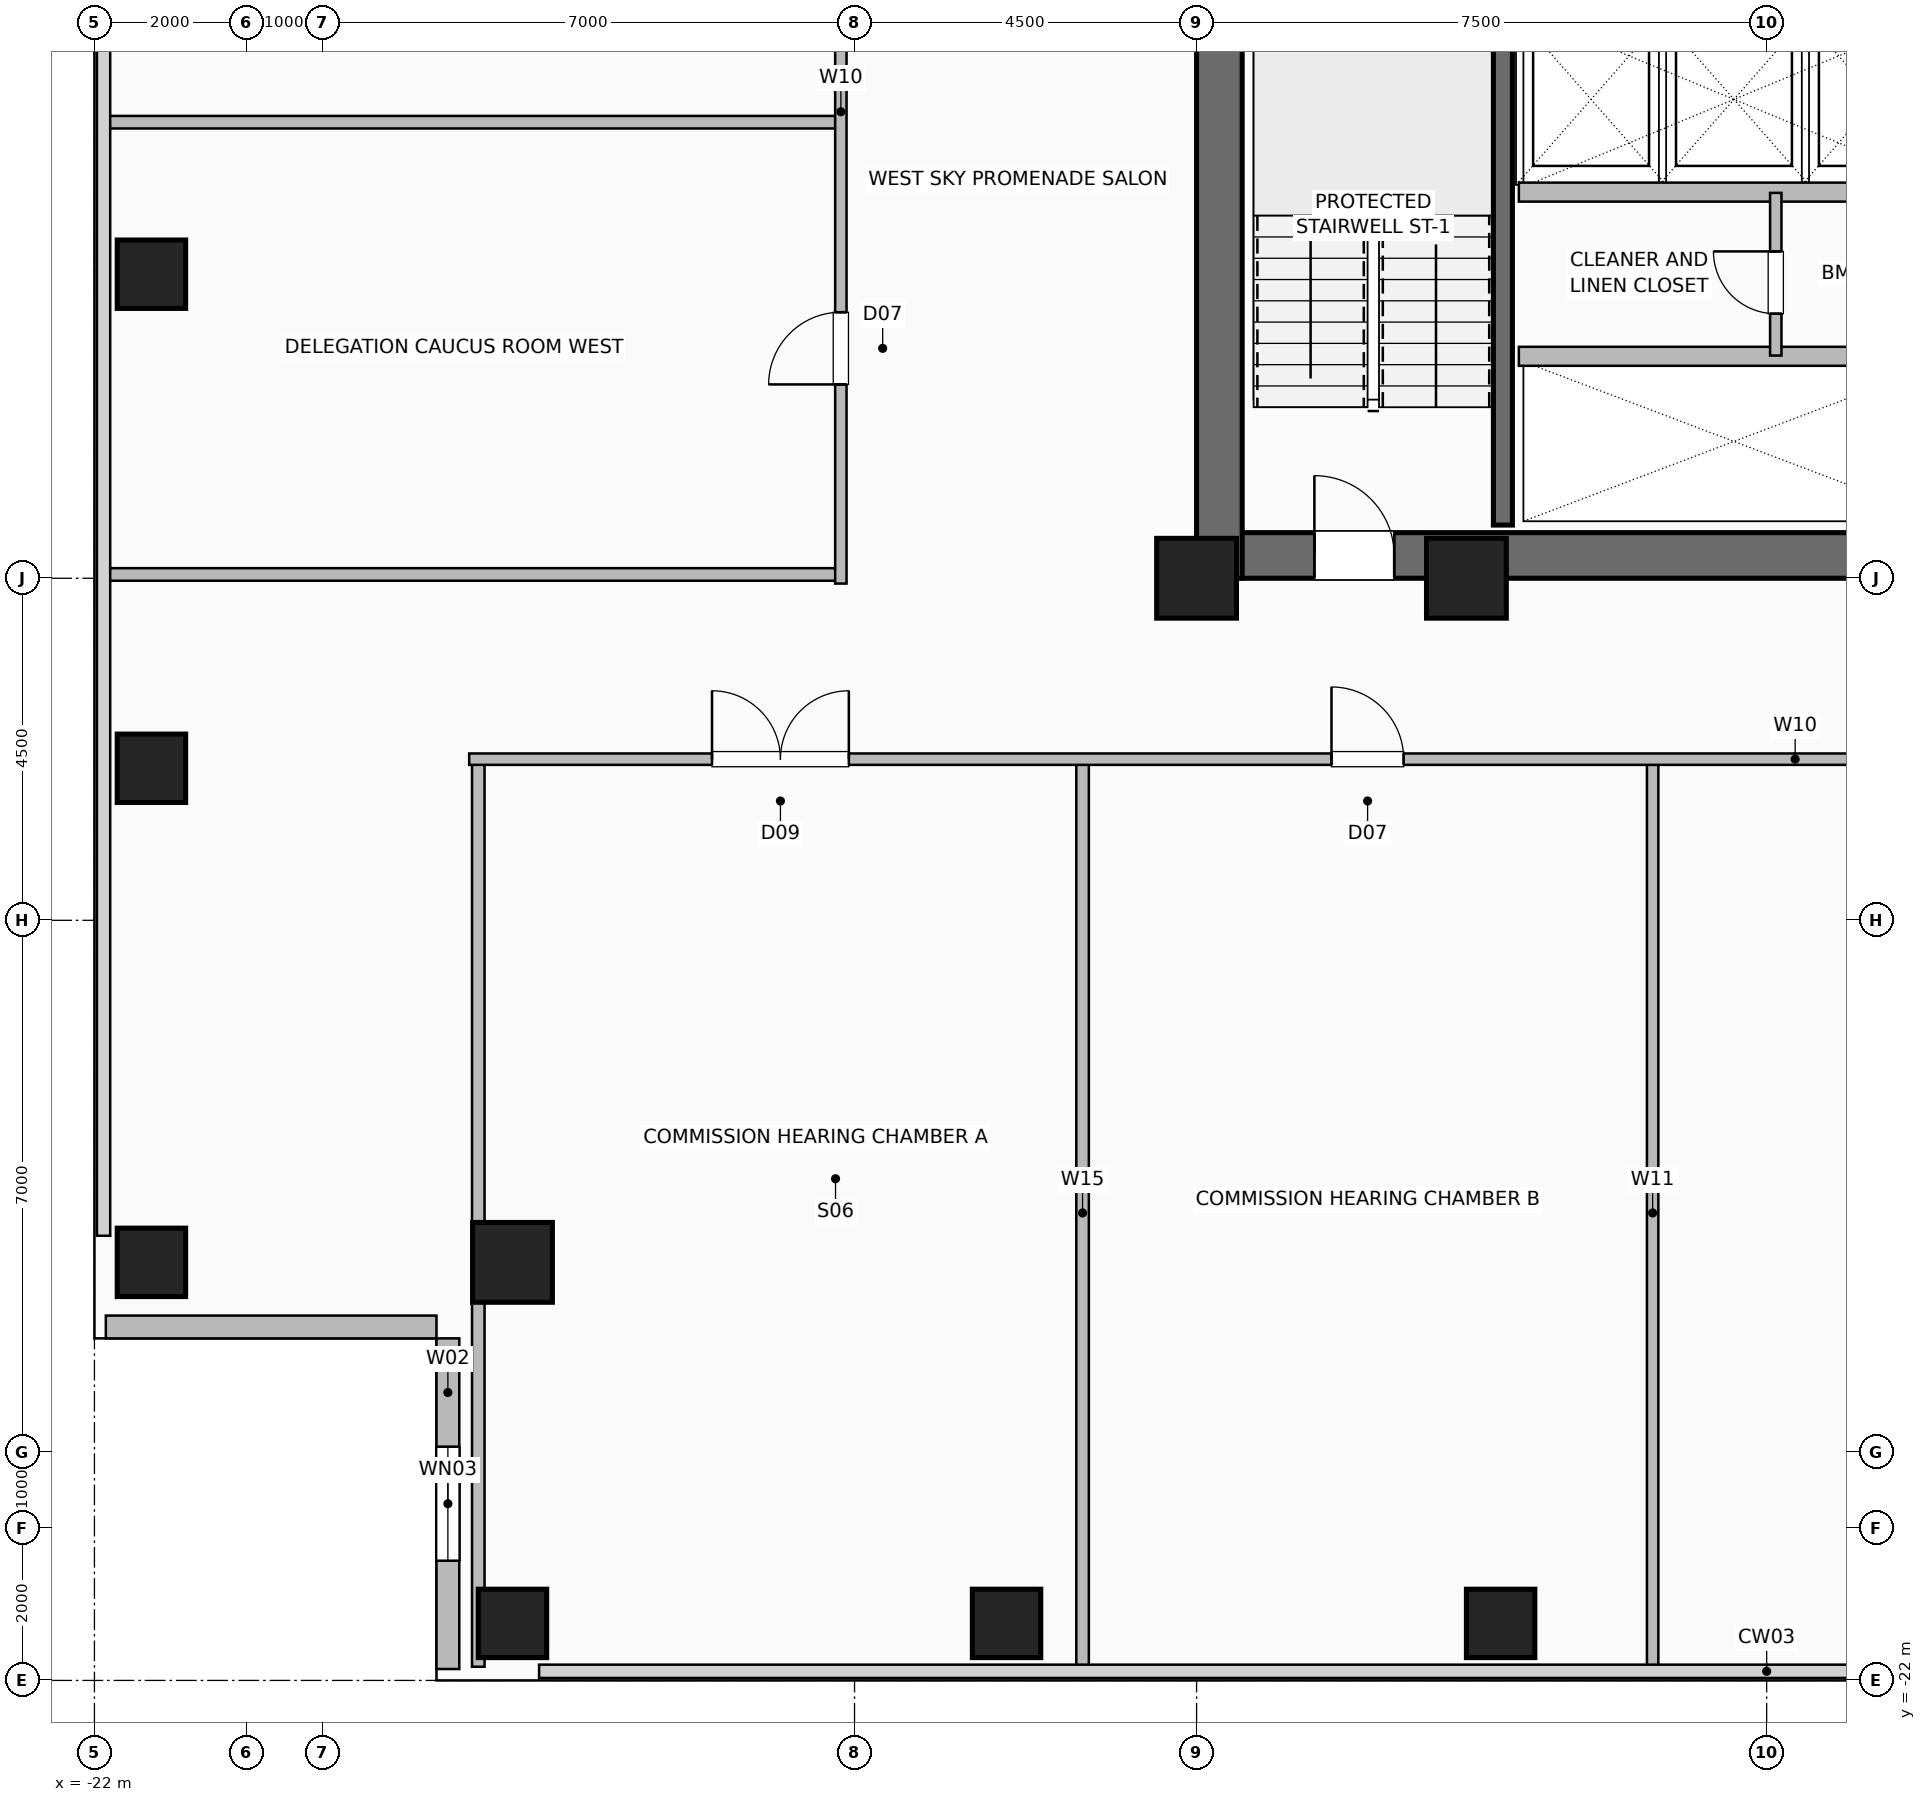
"""IFC4 building model, lengths in metres.
Left out: names, types, materials, properties, quantities, classifications, styles, units other than length and angle.
Written with IfcOpenShell. Run it as: python <this file> out.ifc"""

import sys

from ifc_helpers import new_model, si_unit, direction, frame, frame_2d, origin, origin_2d, place, context, subcontext, project, spatial, rectangle, hollow_rectangle, extrude, element, fill, save


model = new_model("IFC4")
c1 = context("Model", 3, precision=1e-05, world=origin(), true_north=direction((0.0, 1.0)))
c2 = subcontext(c1, "Body", "Model", "MODEL_VIEW")
j1 = project(units=[si_unit("LENGTHUNIT", "METRE"), si_unit("PLANEANGLEUNIT", "RADIAN")], contexts=[c1])
p1 = place(None, origin())
s1 = spatial("IfcSite", under=j1, at=p1, CompositionType="ELEMENT")
p2 = place(p1, origin())
s2 = spatial("IfcBuilding", under=s1, at=p2, CompositionType="ELEMENT")
p3 = place(p2, frame((0.0, 0.0, 97.6)))
s3 = spatial("IfcBuildingStorey", under=s2, at=p3, CompositionType="ELEMENT", Elevation=97.6)
for number, where, z_axis, x_axis in (
    (1, (-7.5, -7.5, 0.0), (0.0, 0.0, 1.0), (1.0, 0.0, 0.0)),
    (2, (-3.95, -7.5, 0.0), (0.0, 0.0, 1.0), (1.0, 0.0, 0.0)),
):
    element("IfcColumn", number, at=place(p3, frame(where, z_axis=z_axis, x_axis=x_axis)), inside=s3, PredefinedType="COLUMN", context=c2, shape_type="SweptSolid", body=[
        extrude(hollow_rectangle(XDim=1.05, YDim=1.05, WallThickness=0.05, at=origin_2d()), origin(), (0.0, 0.0, 1.0), 3.6),
    ])
for number, where, z_axis, x_axis in (
    (3, (-16.5, -21.25, 0.0), (0.0, 0.0, 1.0), (1.0, 0.0, 0.0)),
    (4, (-21.25, -16.5, 0.0), (0.0, 0.0, 1.0), (1.0, 0.0, 0.0)),
    (5, (-10.0, -21.25, 0.0), (0.0, 0.0, 1.0), (1.0, 0.0, 0.0)),
    (6, (-21.25, -10.0, 0.0), (0.0, 0.0, 1.0), (1.0, 0.0, 0.0)),
    (7, (-3.5, -21.25, 0.0), (0.0, 0.0, 1.0), (1.0, 0.0, 0.0)),
    (8, (-21.25, -3.5, 0.0), (0.0, 0.0, 1.0), (1.0, 0.0, 0.0)),
):
    element("IfcColumn", number, at=place(p3, frame(where, z_axis=z_axis, x_axis=x_axis)), inside=s3, PredefinedType="COLUMN", context=c2, shape_type="SweptSolid", body=[
        extrude(hollow_rectangle(XDim=0.9, YDim=0.9, WallThickness=0.045, at=origin_2d()), origin(), (0.0, 0.0, 1.0), 3.6),
    ])
p4 = place(p3, frame((-16.5, -16.5, 0.0), z_axis=(0.0, 0.0, 1.0), x_axis=(1.0, 0.0, 0.0)))
e9 = element("IfcColumn", 9, at=p4, inside=s3, PredefinedType="COLUMN", context=c2, shape_type="SweptSolid", body=[
    extrude(hollow_rectangle(XDim=1.05, YDim=1.05, WallThickness=0.05, at=origin_2d()), origin(), (0.0, 0.0, 1.0), 3.6),
])
p5 = place(p3, frame((-17.35, -21.85, 0.0), z_axis=(0.0, 0.0, 1.0), x_axis=(0.0, 1.0, 0.0)))
e10 = element("IfcWall", 10, at=p5, inside=s3, PredefinedType="SOLIDWALL", context=c2, shape_type="SweptSolid", body=[
    extrude(rectangle(XDim=4.35, YDim=0.3, at=frame_2d((2.175, 0.0))), origin(), (0.0, 0.0, 1.0), 3.36),
])
p6 = place(p5, frame((1.425, 0.0, 0.9)))
e11 = element("IfcOpeningElement", 11, at=p6, cuts=e10, PredefinedType="OPENING", context=c2, shape_type="SweptSolid", body=[
    extrude(rectangle(XDim=1.5, YDim=1.8, at=frame_2d((0.75, 0.9))), frame((0.0, 0.16, 0.0), z_axis=(0.0, -1.0, 0.0), x_axis=(1.0, 0.0, 0.0)), (0.0, 0.0, 1.0), 0.32),
])
p7 = place(p3, frame((-21.85, -17.35, 0.0), z_axis=(0.0, 0.0, 1.0), x_axis=(1.0, 0.0, 0.0)))
e12 = element("IfcWall", 12, at=p7, inside=s3, PredefinedType="SOLIDWALL", context=c2, shape_type="SweptSolid", body=[
    extrude(rectangle(XDim=4.35, YDim=0.3, at=frame_2d((2.175, 0.0))), origin(), (0.0, 0.0, 1.0), 3.36),
])
p8 = place(p3, frame((-7.5, -7.2, 0.0), z_axis=(0.0, 0.0, 1.0), x_axis=(1.0, 0.0, 0.0)))
e13 = element("IfcWall", 13, at=p8, inside=s3, PredefinedType="SHEAR", context=c2, shape_type="SweptSolid", body=[
    extrude(rectangle(XDim=15.0, YDim=0.6, at=frame_2d((7.5, 0.0))), origin(), (0.0, 0.0, 1.0), 3.36),
])
p9 = place(p8, frame((1.55, 0.0, 0.0)))
e14 = element("IfcOpeningElement", 14, at=p9, cuts=e13, PredefinedType="OPENING", context=c2, shape_type="SweptSolid", body=[
    extrude(rectangle(XDim=1.05, YDim=2.08, at=frame_2d((0.525, 1.04))), frame((0.0, 0.31, 0.0), z_axis=(0.0, -1.0, 0.0), x_axis=(1.0, 0.0, 0.0)), (0.0, 0.0, 1.0), 0.62),
])
p10 = place(p8, frame((12.4, 0.0, 0.0)))
e15 = element("IfcOpeningElement", 15, at=p10, cuts=e13, PredefinedType="OPENING", context=c2, shape_type="SweptSolid", body=[
    extrude(rectangle(XDim=1.05, YDim=2.08, at=frame_2d((0.525, 1.04))), frame((0.0, 0.31, 0.0), z_axis=(0.0, -1.0, 0.0), x_axis=(1.0, 0.0, 0.0)), (0.0, 0.0, 1.0), 0.62),
])
p11 = place(p3, frame((-7.2, -7.5, 0.0), z_axis=(0.0, 0.0, 1.0), x_axis=(0.0, 1.0, 0.0)))
e16 = element("IfcWall", 16, at=p11, inside=s3, PredefinedType="SHEAR", context=c2, shape_type="SweptSolid", body=[
    extrude(rectangle(XDim=15.0, YDim=0.6, at=frame_2d((7.5, 0.0))), origin(), (0.0, 0.0, 1.0), 3.36),
])
p12 = place(p11, frame((9.5, 0.0, 0.0)))
e17 = element("IfcOpeningElement", 17, at=p12, cuts=e16, PredefinedType="OPENING", context=c2, shape_type="SweptSolid", body=[
    extrude(rectangle(XDim=1.0, YDim=2.08, at=frame_2d((0.5, 1.04))), frame((0.0, 0.31, 0.0), z_axis=(0.0, -1.0, 0.0), x_axis=(1.0, 0.0, 0.0)), (0.0, 0.0, 1.0), 0.62),
])
p13 = place(p3, frame((-3.47, -6.8, 0.0), z_axis=(0.0, 0.0, 1.0), x_axis=(0.0, 1.0, 0.0)))
e18 = element("IfcWall", 18, at=p13, inside=s3, PredefinedType="SHEAR", context=c2, shape_type="SweptSolid", body=[
    extrude(rectangle(XDim=7.72, YDim=0.25, at=frame_2d((3.86, 0.0))), origin(), (0.0, 0.0, 1.0), 3.36),
])
for number, where, z_axis, x_axis in (
    (19, (-3.26, -4.58, 0.0), (0.0, 0.0, 1.0), (1.0, 0.0, 0.0)),
    (20, (-3.26, -2.42, 0.0), (0.0, 0.0, 1.0), (1.0, 0.0, 0.0)),
):
    element("IfcWall", number, at=place(p3, frame(where, z_axis=z_axis, x_axis=x_axis)), inside=s3, PredefinedType="SHEAR", context=c2, shape_type="SweptSolid", body=[
        extrude(rectangle(XDim=5.64, YDim=0.25, at=frame_2d((2.82, 0.0))), origin(), (0.0, 0.0, 1.0), 3.36),
    ])
p14 = place(p3, frame((0.12, -4.57, 0.0), z_axis=(0.0, 0.0, 1.0), x_axis=(0.0, 1.0, 0.0)))
e21 = element("IfcWall", 21, at=p14, inside=s3, PredefinedType="PARTITIONING", context=c2, shape_type="SweptSolid", body=[
    extrude(rectangle(XDim=2.14, YDim=0.15, at=frame_2d((1.07, 0.0))), origin(), (0.0, 0.0, 1.0), 3.36),
])
p15 = place(p14, frame((0.55, 0.0, 0.0)))
e22 = element("IfcOpeningElement", 22, at=p15, cuts=e21, PredefinedType="OPENING", context=c2, shape_type="SweptSolid", body=[
    extrude(rectangle(XDim=0.82, YDim=2.05, at=frame_2d((0.41, 1.025))), frame((0.0, 0.085, 0.0), z_axis=(0.0, -1.0, 0.0), x_axis=(1.0, 0.0, 0.0)), (0.0, 0.0, 1.0), 0.17),
])
for number, where, z_axis, x_axis in (
    (23, (-16.95, -21.82, 0.0), (0.0, 0.0, 1.0), (0.0, 1.0, 0.0)),
    (24, (-9.0, -21.82, 0.0), (0.0, 0.0, 1.0), (0.0, 1.0, 0.0)),
):
    element("IfcWall", number, at=place(p3, frame(where, z_axis=z_axis, x_axis=x_axis)), inside=s3, PredefinedType="PLUMBINGWALL", context=c2, shape_type="SweptSolid", body=[
        extrude(rectangle(XDim=11.94, YDim=0.165, at=frame_2d((5.97, 0.0))), origin(), (0.0, 0.0, 1.0), 3.36),
    ])
p16 = place(p3, frame((-1.5, -21.82, 0.0), z_axis=(0.0, 0.0, 1.0), x_axis=(0.0, 1.0, 0.0)))
e25 = element("IfcWall", 25, at=p16, inside=s3, PredefinedType="PARTITIONING", context=c2, shape_type="SweptSolid", body=[
    extrude(rectangle(XDim=11.94, YDim=0.15, at=frame_2d((5.97, 0.0))), origin(), (0.0, 0.0, 1.0), 3.36),
])
p17 = place(p3, frame((-17.07, -9.88, 0.0), z_axis=(0.0, 0.0, 1.0), x_axis=(1.0, 0.0, 0.0)))
e26 = element("IfcWall", 26, at=p17, inside=s3, PredefinedType="PARTITIONING", context=c2, shape_type="SweptSolid", body=[
    extrude(rectangle(XDim=34.14, YDim=0.15, at=frame_2d((17.07, 0.0))), origin(), (0.0, 0.0, 1.0), 3.36),
])
p18 = place(p17, frame((3.195, 0.0, 0.0)))
e27 = element("IfcOpeningElement", 27, at=p18, cuts=e26, PredefinedType="OPENING", context=c2, shape_type="SweptSolid", body=[
    extrude(rectangle(XDim=1.8, YDim=2.08, at=frame_2d((0.9, 1.04))), frame((0.0, 0.085, 0.0), z_axis=(0.0, -1.0, 0.0), x_axis=(1.0, 0.0, 0.0)), (0.0, 0.0, 1.0), 0.17),
])
p19 = place(p17, frame((11.345, 0.0, 0.0)))
e28 = element("IfcOpeningElement", 28, at=p19, cuts=e26, PredefinedType="OPENING", context=c2, shape_type="SweptSolid", body=[
    extrude(rectangle(XDim=0.95, YDim=2.06, at=frame_2d((0.475, 1.03))), frame((0.0, 0.085, 0.0), z_axis=(0.0, -1.0, 0.0), x_axis=(1.0, 0.0, 0.0)), (0.0, 0.0, 1.0), 0.17),
])
p20 = place(p17, frame((22.595, 0.0, 0.0)))
e29 = element("IfcOpeningElement", 29, at=p20, cuts=e26, PredefinedType="OPENING", context=c2, shape_type="SweptSolid", body=[
    extrude(rectangle(XDim=0.95, YDim=2.06, at=frame_2d((0.475, 1.03))), frame((0.0, 0.085, 0.0), z_axis=(0.0, -1.0, 0.0), x_axis=(1.0, 0.0, 0.0)), (0.0, 0.0, 1.0), 0.17),
])
p21 = place(p17, frame((30.925, 0.0, 0.0)))
e30 = element("IfcOpeningElement", 30, at=p21, cuts=e26, PredefinedType="OPENING", context=c2, shape_type="SweptSolid", body=[
    extrude(rectangle(XDim=0.85, YDim=2.05, at=frame_2d((0.425, 1.025))), frame((0.0, 0.085, 0.0), z_axis=(0.0, -1.0, 0.0), x_axis=(1.0, 0.0, 0.0)), (0.0, 0.0, 1.0), 0.17),
])
p22 = place(p17, frame((32.6, 0.0, 0.0)))
e31 = element("IfcOpeningElement", 31, at=p22, cuts=e26, PredefinedType="OPENING", context=c2, shape_type="SweptSolid", body=[
    extrude(rectangle(XDim=0.95, YDim=2.06, at=frame_2d((0.475, 1.03))), frame((0.0, 0.085, 0.0), z_axis=(0.0, -1.0, 0.0), x_axis=(1.0, 0.0, 0.0)), (0.0, 0.0, 1.0), 0.17),
])
for number, where, z_axis, x_axis in (
    (32, (-21.82, -7.45, 0.0), (0.0, 0.0, 1.0), (1.0, 0.0, 0.0)),
    (33, (-21.82, -1.5, 0.0), (0.0, 0.0, 1.0), (1.0, 0.0, 0.0)),
):
    element("IfcWall", number, at=place(p3, frame(where, z_axis=z_axis, x_axis=x_axis)), inside=s3, PredefinedType="PLUMBINGWALL", context=c2, shape_type="SweptSolid", body=[
        extrude(rectangle(XDim=9.64, YDim=0.165, at=frame_2d((4.82, 0.0))), origin(), (0.0, 0.0, 1.0), 3.36),
    ])
p23 = place(p3, frame((-12.18, -7.57, 0.0), z_axis=(0.0, 0.0, 1.0), x_axis=(0.0, 1.0, 0.0)))
e34 = element("IfcWall", 34, at=p23, inside=s3, PredefinedType="PARTITIONING", context=c2, shape_type="SweptSolid", body=[
    extrude(rectangle(XDim=15.14, YDim=0.15, at=frame_2d((7.57, 0.0))), origin(), (0.0, 0.0, 1.0), 3.36),
])
p24 = place(p23, frame((2.62, 0.0, 0.0)))
e35 = element("IfcOpeningElement", 35, at=p24, cuts=e34, PredefinedType="OPENING", context=c2, shape_type="SweptSolid", body=[
    extrude(rectangle(XDim=0.95, YDim=2.06, at=frame_2d((0.475, 1.03))), frame((0.0, 0.085, 0.0), z_axis=(0.0, -1.0, 0.0), x_axis=(1.0, 0.0, 0.0)), (0.0, 0.0, 1.0), 0.17),
])
p25 = place(p23, frame((8.845, 0.0, 0.0)))
e36 = element("IfcOpeningElement", 36, at=p25, cuts=e34, PredefinedType="OPENING", context=c2, shape_type="SweptSolid", body=[
    extrude(rectangle(XDim=0.95, YDim=2.06, at=frame_2d((0.475, 1.03))), frame((0.0, 0.085, 0.0), z_axis=(0.0, -1.0, 0.0), x_axis=(1.0, 0.0, 0.0)), (0.0, 0.0, 1.0), 0.17),
])
p26 = place(p23, frame((13.37, 0.0, 0.0)))
e37 = element("IfcOpeningElement", 37, at=p26, cuts=e34, PredefinedType="OPENING", context=c2, shape_type="SweptSolid", body=[
    extrude(rectangle(XDim=0.85, YDim=2.05, at=frame_2d((0.425, 1.025))), frame((0.0, 0.085, 0.0), z_axis=(0.0, -1.0, 0.0), x_axis=(1.0, 0.0, 0.0)), (0.0, 0.0, 1.0), 0.17),
])
p27 = place(p6, origin())
e38 = element("IfcWindow", 38, at=p27, inside=s3, PartitioningType="SINGLE_PANEL", PredefinedType="WINDOW", context=c2, shape_type="SweptSolid", body=[
    extrude(rectangle(XDim=1.5, YDim=1.8, at=frame_2d((0.75, 0.9))), frame((0.0, 0.03, 0.0), z_axis=(0.0, -1.0, 0.0), x_axis=(1.0, 0.0, 0.0)), (0.0, 0.0, 1.0), 0.06),
])
fill(e11, e38)
p28 = place(p9, origin())
e39 = element("IfcDoor", 39, at=p28, inside=s3, OperationType="SINGLE_SWING_LEFT", PredefinedType="DOOR", context=c2, shape_type="SweptSolid", body=[
    extrude(rectangle(XDim=1.05, YDim=2.08, at=frame_2d((0.525, 1.04))), frame((0.0, 0.025, 0.0), z_axis=(0.0, -1.0, 0.0), x_axis=(1.0, 0.0, 0.0)), (0.0, 0.0, 1.0), 0.05),
])
fill(e14, e39)
p29 = place(p15, origin())
e40 = element("IfcDoor", 40, at=p29, inside=s3, OperationType="SINGLE_SWING_RIGHT", PredefinedType="DOOR", context=c2, shape_type="SweptSolid", body=[
    extrude(rectangle(XDim=0.82, YDim=2.05, at=frame_2d((0.41, 1.025))), frame((0.0, 0.025, 0.0), z_axis=(0.0, -1.0, 0.0), x_axis=(1.0, 0.0, 0.0)), (0.0, 0.0, 1.0), 0.05),
])
fill(e22, e40)
p30 = place(p18, origin())
e41 = element("IfcDoor", 41, at=p30, inside=s3, OperationType="DOUBLE_DOOR_SINGLE_SWING", PredefinedType="DOOR", context=c2, shape_type="SweptSolid", body=[
    extrude(rectangle(XDim=1.8, YDim=2.08, at=frame_2d((0.9, 1.04))), frame((0.0, 0.025, 0.0), z_axis=(0.0, -1.0, 0.0), x_axis=(1.0, 0.0, 0.0)), (0.0, 0.0, 1.0), 0.05),
])
fill(e27, e41)
p31 = place(p19, origin())
e42 = element("IfcDoor", 42, at=p31, inside=s3, OperationType="SINGLE_SWING_LEFT", PredefinedType="DOOR", context=c2, shape_type="SweptSolid", body=[
    extrude(rectangle(XDim=0.95, YDim=2.06, at=frame_2d((0.475, 1.03))), frame((0.0, 0.025, 0.0), z_axis=(0.0, -1.0, 0.0), x_axis=(1.0, 0.0, 0.0)), (0.0, 0.0, 1.0), 0.05),
])
fill(e28, e42)
p32 = place(p24, origin())
e43 = element("IfcDoor", 43, at=p32, inside=s3, OperationType="SINGLE_SWING_LEFT", PredefinedType="DOOR", context=c2, shape_type="SweptSolid", body=[
    extrude(rectangle(XDim=0.95, YDim=2.06, at=frame_2d((0.475, 1.03))), frame((0.0, 0.025, 0.0), z_axis=(0.0, -1.0, 0.0), x_axis=(1.0, 0.0, 0.0)), (0.0, 0.0, 1.0), 0.05),
])
fill(e35, e43)
save(model, sys.argv[1])
